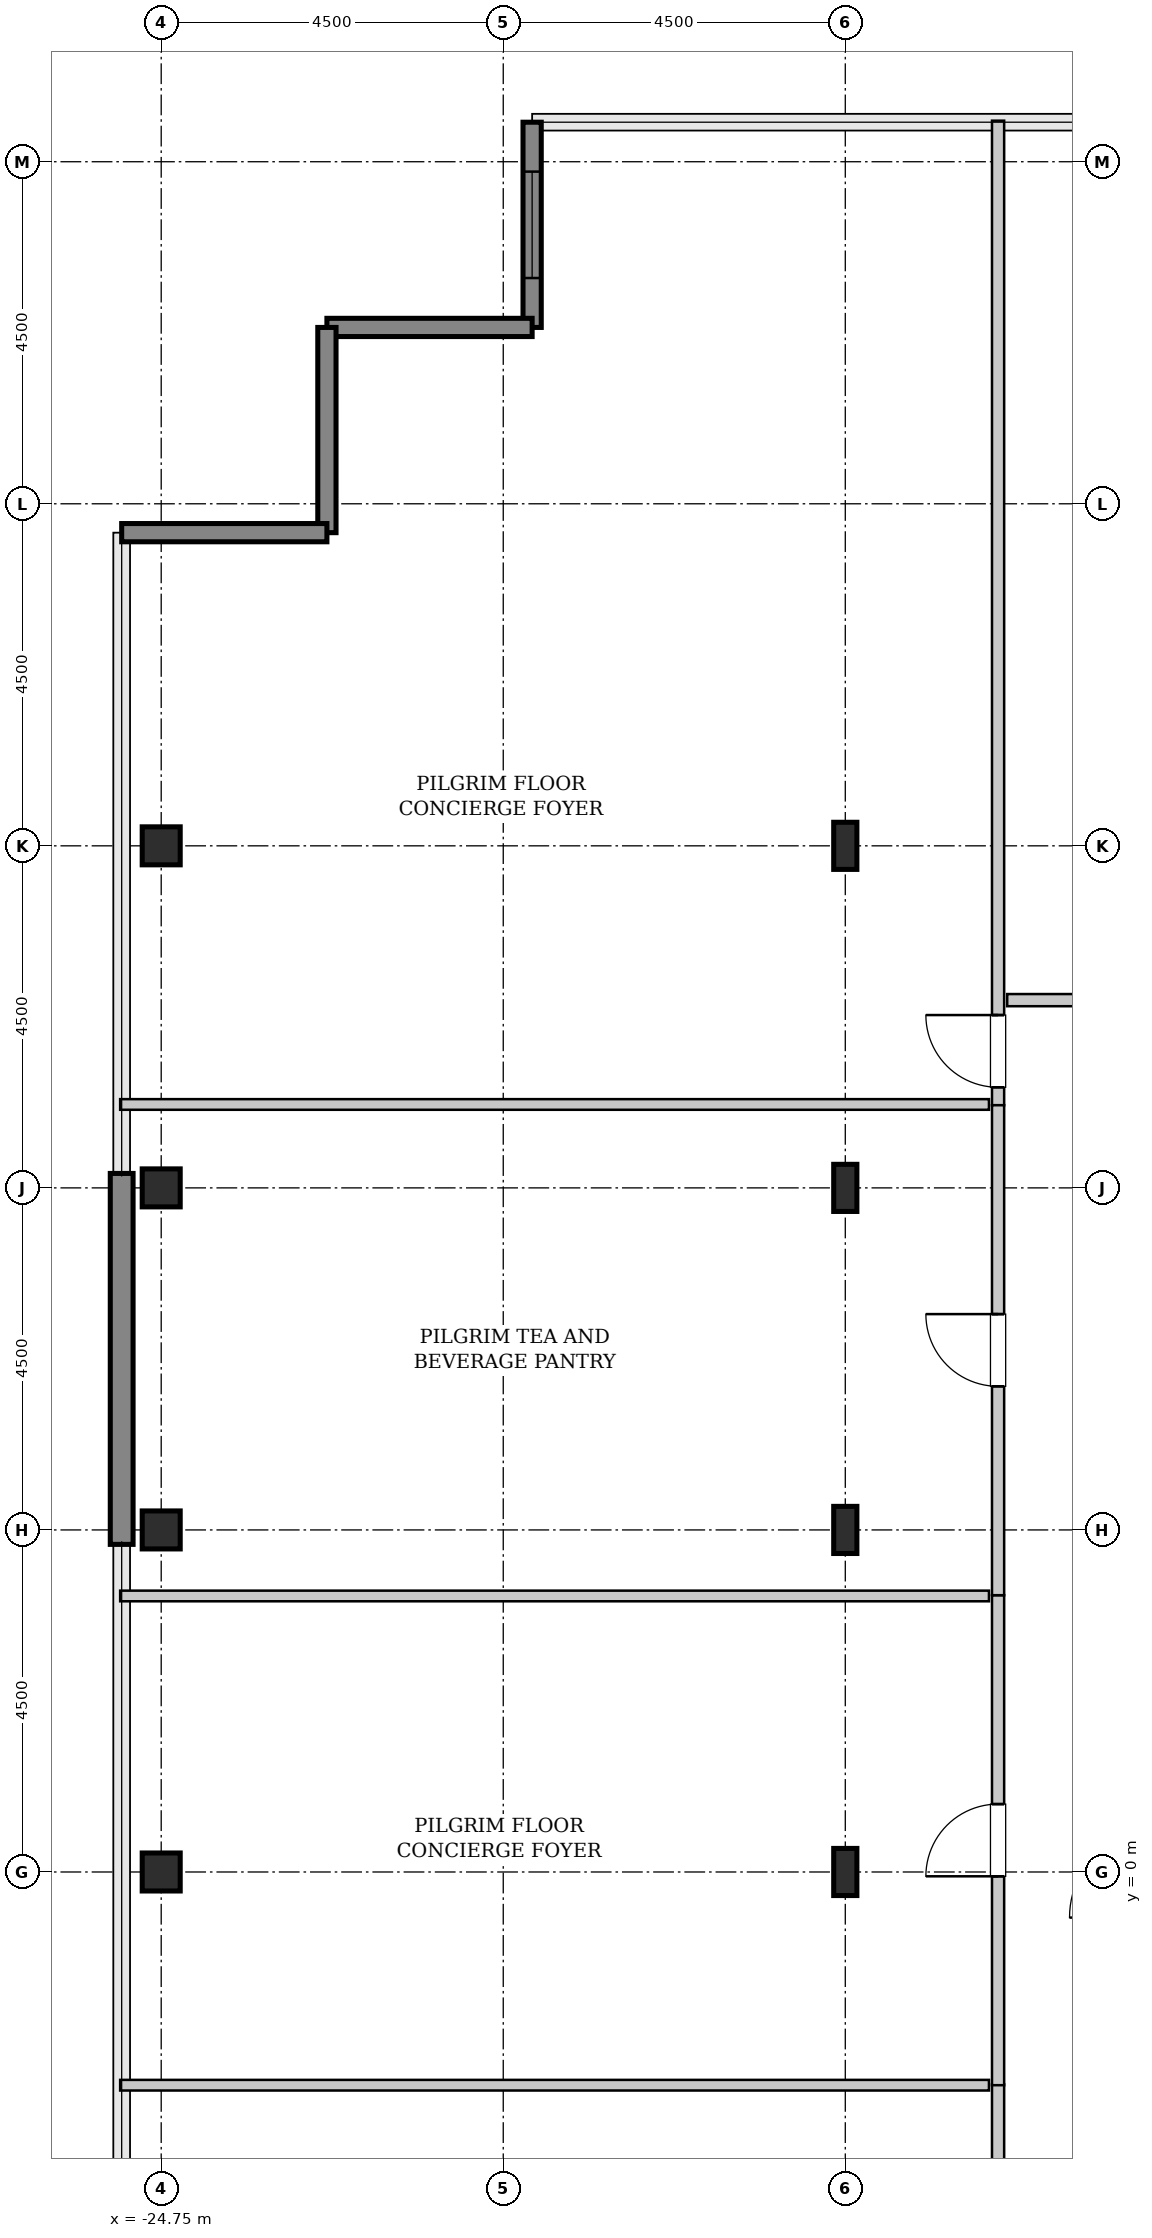
"""IFC4 building model, lengths in metres.
Left out: names, types, materials, properties, quantities, classifications, styles, units other than length and angle.
Written with IfcOpenShell. Run it as: python <this file> out.ifc"""

import sys

from ifc_helpers import new_model, si_unit, direction, frame, frame_2d, origin, origin_2d, place, context, subcontext, project, spatial, rectangle, hollow_rectangle, i_section, extrude, source, transform, mapped, element, fill, save


model = new_model("IFC4")
c1 = context("Model", 3, precision=1e-05, world=origin(), true_north=direction((0.0, 1.0)))
c2 = subcontext(c1, "Body", "Model", "MODEL_VIEW")
j1 = project(units=[si_unit("LENGTHUNIT", "METRE"), si_unit("PLANEANGLEUNIT", "RADIAN")], contexts=[c1])
p1 = place(None, origin())
s1 = spatial("IfcSite", under=j1, at=p1, CompositionType="ELEMENT")
p2 = place(p1, origin())
s2 = spatial("IfcBuilding", under=s1, at=p2, CompositionType="ELEMENT")
p3 = place(p2, frame((0.0, 0.0, 333.8)))
s3 = spatial("IfcBuildingStorey", under=s2, at=p3, CompositionType="ELEMENT", Elevation=333.8)
m1 = source(origin(), c2, "Body", "SweptSolid", [
    extrude(hollow_rectangle(XDim=0.5, YDim=0.5, WallThickness=0.025, InnerFilletRadius=0.025, OuterFilletRadius=0.05, at=origin_2d()), origin(), (0.0, 0.0, 1.0), 3.8),
])
for number, where, z_axis, x_axis in (
    (1, (-24.75, 0.0, 0.0), (0.0, 0.0, 1.0), (1.0, 0.0, 0.0)),
    (2, (-24.75, 4.5, 0.0), (0.0, 0.0, 1.0), (1.0, 0.0, 0.0)),
    (3, (-24.75, 9.0, 0.0), (0.0, 0.0, 1.0), (1.0, 0.0, 0.0)),
    (4, (-24.75, 13.5, 0.0), (0.0, 0.0, 1.0), (1.0, 0.0, 0.0)),
):
    element("IfcColumn", number, at=place(p3, frame(where, z_axis=z_axis, x_axis=x_axis)), inside=s3, PredefinedType="COLUMN", context=c2, shape_type="MappedRepresentation", body=[
        mapped(m1, transform((0.0, 0.0, 0.0), x_axis=(1.0, 0.0, 0.0), y_axis=(0.0, 1.0, 0.0), z_axis=(0.0, 0.0, 1.0), scale=1.0)),
    ])
m2 = source(origin(), c2, "Body", "SweptSolid", [
    extrude(i_section(OverallWidth=0.305, OverallDepth=0.62, WebThickness=0.021, FlangeThickness=0.04, FilletRadius=0.027, at=origin_2d()), origin(), (0.0, 0.0, 1.0), 3.8),
])
for number, where, z_axis, x_axis in (
    (5, (-15.75, 0.0, 0.0), (0.0, 0.0, 1.0), (1.0, 0.0, 0.0)),
    (6, (-15.75, 4.5, 0.0), (0.0, 0.0, 1.0), (1.0, 0.0, 0.0)),
    (7, (-15.75, 9.0, 0.0), (0.0, 0.0, 1.0), (1.0, 0.0, 0.0)),
    (8, (-15.75, 13.5, 0.0), (0.0, 0.0, 1.0), (1.0, 0.0, 0.0)),
):
    element("IfcColumn", number, at=place(p3, frame(where, z_axis=z_axis, x_axis=x_axis)), inside=s3, PredefinedType="COLUMN", context=c2, shape_type="MappedRepresentation", body=[
        mapped(m2, transform((0.0, 0.0, 0.0), x_axis=(1.0, 0.0, 0.0), y_axis=(0.0, 1.0, 0.0), z_axis=(0.0, 0.0, 1.0), scale=1.0)),
    ])
m3 = source(origin(), c2, "Body", "SweptSolid", [
    extrude(rectangle(XDim=4.88, YDim=0.3, at=frame_2d((2.44, 0.0))), origin(), (0.0, 0.0, 1.0), 3.55),
])
p4 = place(p3, frame((-25.27, 4.31, 0.0), z_axis=(0.0, 0.0, 1.0), x_axis=(0.0, 1.0, 0.0)))
e9 = element("IfcWall", 9, at=p4, inside=s3, PredefinedType="SHEAR", context=c2, shape_type="MappedRepresentation", body=[
    mapped(m3, transform((0.0, 0.0, 0.0), x_axis=(1.0, 0.0, 0.0), y_axis=(0.0, 1.0, 0.0), z_axis=(0.0, 0.0, 1.0), scale=1.0)),
])
m4 = source(origin(), c2, "Body", "SweptSolid", [
    extrude(rectangle(XDim=2.7, YDim=0.24, at=frame_2d((1.35, 0.0))), origin(), (0.0, 0.0, 1.0), 3.55),
])
p5 = place(p3, frame((-19.87, 23.02, 0.0), z_axis=(0.0, 0.0, 1.0), x_axis=(0.0, -1.0, 0.0)))
e10 = element("IfcWall", 10, at=p5, inside=s3, PredefinedType="SHEAR", context=c2, shape_type="MappedRepresentation", body=[
    mapped(m4, transform((0.0, 0.0, 0.0), x_axis=(1.0, 0.0, 0.0), y_axis=(0.0, 1.0, 0.0), z_axis=(0.0, 0.0, 1.0), scale=1.0)),
])
p6 = place(p5, frame((0.65, 0.0, 0.85)))
e11 = element("IfcOpeningElement", 11, at=p6, cuts=e10, PredefinedType="OPENING", context=c2, shape_type="SweptSolid", body=[
    extrude(rectangle(XDim=1.4, YDim=1.8, at=frame_2d((0.7, 0.9))), frame((0.0, 0.13, 0.0), z_axis=(0.0, -1.0, 0.0), x_axis=(1.0, 0.0, 0.0)), (0.0, 0.0, 1.0), 0.26),
])
for number, where, z_axis, x_axis in (
    (12, (-19.87, 20.32, 0.0), (0.0, 0.0, 1.0), (-1.0, 0.0, 0.0)),
    (13, (-22.57, 20.32, 0.0), (0.0, 0.0, 1.0), (0.0, -1.0, 0.0)),
    (14, (-22.57, 17.62, 0.0), (0.0, 0.0, 1.0), (-1.0, 0.0, 0.0)),
):
    element("IfcWall", number, at=place(p3, frame(where, z_axis=z_axis, x_axis=x_axis)), inside=s3, PredefinedType="SHEAR", context=c2, shape_type="MappedRepresentation", body=[
        mapped(m4, transform((0.0, 0.0, 0.0), x_axis=(1.0, 0.0, 0.0), y_axis=(0.0, 1.0, 0.0), z_axis=(0.0, 0.0, 1.0), scale=1.0)),
    ])
m5 = source(origin(), c2, "Body", "SweptSolid", [
    extrude(rectangle(XDim=20.245, YDim=0.16, at=frame_2d((10.123, 0.0))), origin(), (0.0, 0.0, 1.0), 3.535),
])
p7 = place(p3, frame((-13.74, -23.04, 0.0), z_axis=(0.0, 0.0, 1.0), x_axis=(0.0, 1.0, 0.0)))
e15 = element("IfcWall", 15, at=p7, inside=s3, PredefinedType="PARTITIONING", context=c2, shape_type="MappedRepresentation", body=[
    mapped(m5, transform((0.0, 0.0, 0.0), x_axis=(1.0, 0.0, 0.0), y_axis=(0.0, 1.0, 0.0), z_axis=(0.0, 0.0, 1.0), scale=1.0)),
])
p8 = place(p7, frame((15.413, 0.0, 0.0)))
e16 = element("IfcOpeningElement", 16, at=p8, cuts=e15, PredefinedType="OPENING", context=c2, shape_type="SweptSolid", body=[
    extrude(rectangle(XDim=0.95, YDim=2.1, at=frame_2d((0.475, 1.05))), frame((0.0, 0.09, 0.0), z_axis=(0.0, -1.0, 0.0), x_axis=(1.0, 0.0, 0.0)), (0.0, 0.0, 1.0), 0.18),
])
m6 = source(origin(), c2, "Body", "SweptSolid", [
    extrude(rectangle(XDim=11.43, YDim=0.14, at=frame_2d((5.715, 0.0))), origin(), (0.0, 0.0, 1.0), 3.535),
])
p9 = place(p3, frame((-25.29, -2.805, 0.0), z_axis=(0.0, 0.0, 1.0), x_axis=(1.0, 0.0, 0.0)))
e17 = element("IfcWall", 17, at=p9, inside=s3, PredefinedType="PARTITIONING", context=c2, shape_type="MappedRepresentation", body=[
    mapped(m6, transform((0.0, 0.0, 0.0), x_axis=(1.0, 0.0, 0.0), y_axis=(0.0, 1.0, 0.0), z_axis=(0.0, 0.0, 1.0), scale=1.0)),
])
m7 = source(origin(), c2, "Body", "SweptSolid", [
    extrude(rectangle(XDim=12.953, YDim=0.16, at=frame_2d((6.476, 0.0))), origin(), (0.0, 0.0, 1.0), 3.535),
])
p10 = place(p3, frame((-13.74, 10.087, 0.0), z_axis=(0.0, 0.0, 1.0), x_axis=(0.0, 1.0, 0.0)))
e18 = element("IfcWall", 18, at=p10, inside=s3, PredefinedType="PARTITIONING", context=c2, shape_type="MappedRepresentation", body=[
    mapped(m7, transform((0.0, 0.0, 0.0), x_axis=(1.0, 0.0, 0.0), y_axis=(0.0, 1.0, 0.0), z_axis=(0.0, 0.0, 1.0), scale=1.0)),
])
p11 = place(p10, frame((0.236, 0.0, 0.0)))
e19 = element("IfcOpeningElement", 19, at=p11, cuts=e18, PredefinedType="OPENING", context=c2, shape_type="SweptSolid", body=[
    extrude(rectangle(XDim=0.95, YDim=2.1, at=frame_2d((0.475, 1.05))), frame((0.0, 0.09, 0.0), z_axis=(0.0, -1.0, 0.0), x_axis=(1.0, 0.0, 0.0)), (0.0, 0.0, 1.0), 0.18),
])
p12 = place(p3, frame((-25.29, 10.097, 0.0), z_axis=(0.0, 0.0, 1.0), x_axis=(1.0, 0.0, 0.0)))
e20 = element("IfcWall", 20, at=p12, inside=s3, PredefinedType="PARTITIONING", context=c2, shape_type="MappedRepresentation", body=[
    mapped(m6, transform((0.0, 0.0, 0.0), x_axis=(1.0, 0.0, 0.0), y_axis=(0.0, 1.0, 0.0), z_axis=(0.0, 0.0, 1.0), scale=1.0)),
])
m8 = source(origin(), c2, "Body", "SweptSolid", [
    extrude(rectangle(XDim=6.446, YDim=0.16, at=frame_2d((3.223, 0.0))), origin(), (0.0, 0.0, 1.0), 3.535),
])
p13 = place(p3, frame((-13.74, -2.805, 0.0), z_axis=(0.0, 0.0, 1.0), x_axis=(0.0, 1.0, 0.0)))
e21 = element("IfcWall", 21, at=p13, inside=s3, PredefinedType="PARTITIONING", context=c2, shape_type="MappedRepresentation", body=[
    mapped(m8, transform((0.0, 0.0, 0.0), x_axis=(1.0, 0.0, 0.0), y_axis=(0.0, 1.0, 0.0), z_axis=(0.0, 0.0, 1.0), scale=1.0)),
])
p14 = place(p13, frame((2.748, 0.0, 0.0)))
e22 = element("IfcOpeningElement", 22, at=p14, cuts=e21, PredefinedType="OPENING", context=c2, shape_type="SweptSolid", body=[
    extrude(rectangle(XDim=0.95, YDim=2.1, at=frame_2d((0.475, 1.05))), frame((0.0, 0.09, 0.0), z_axis=(0.0, -1.0, 0.0), x_axis=(1.0, 0.0, 0.0)), (0.0, 0.0, 1.0), 0.18),
])
p15 = place(p3, frame((-25.29, 3.631, 0.0), z_axis=(0.0, 0.0, 1.0), x_axis=(1.0, 0.0, 0.0)))
e23 = element("IfcWall", 23, at=p15, inside=s3, PredefinedType="PARTITIONING", context=c2, shape_type="MappedRepresentation", body=[
    mapped(m6, transform((0.0, 0.0, 0.0), x_axis=(1.0, 0.0, 0.0), y_axis=(0.0, 1.0, 0.0), z_axis=(0.0, 0.0, 1.0), scale=1.0)),
])
m9 = source(origin(), c2, "Body", "SweptSolid", [
    extrude(rectangle(XDim=6.446, YDim=0.16, at=frame_2d((3.223, 0.0))), origin(), (0.0, 0.0, 1.0), 3.535),
])
p16 = place(p3, frame((-13.74, 3.641, 0.0), z_axis=(0.0, 0.0, 1.0), x_axis=(0.0, 1.0, 0.0)))
e24 = element("IfcWall", 24, at=p16, inside=s3, PredefinedType="PARTITIONING", context=c2, shape_type="MappedRepresentation", body=[
    mapped(m9, transform((0.0, 0.0, 0.0), x_axis=(1.0, 0.0, 0.0), y_axis=(0.0, 1.0, 0.0), z_axis=(0.0, 0.0, 1.0), scale=1.0)),
])
p17 = place(p16, frame((2.748, 0.0, 0.0)))
e25 = element("IfcOpeningElement", 25, at=p17, cuts=e24, PredefinedType="OPENING", context=c2, shape_type="SweptSolid", body=[
    extrude(rectangle(XDim=0.95, YDim=2.1, at=frame_2d((0.475, 1.05))), frame((0.0, 0.09, 0.0), z_axis=(0.0, -1.0, 0.0), x_axis=(1.0, 0.0, 0.0)), (0.0, 0.0, 1.0), 0.18),
])
m10 = source(origin(), c2, "Body", "SweptSolid", [
    extrude(rectangle(XDim=4.125, YDim=0.16, at=frame_2d((2.062, 0.0))), origin(), (0.0, 0.0, 1.0), 3.535),
])
p18 = place(p3, frame((-13.62, 11.47, 0.0), z_axis=(0.0, 0.0, 1.0), x_axis=(1.0, 0.0, 0.0)))
e26 = element("IfcWall", 26, at=p18, inside=s3, PredefinedType="PARTITIONING", context=c2, shape_type="MappedRepresentation", body=[
    mapped(m10, transform((0.0, 0.0, 0.0), x_axis=(1.0, 0.0, 0.0), y_axis=(0.0, 1.0, 0.0), z_axis=(0.0, 0.0, 1.0), scale=1.0)),
])
p19 = place(p18, frame((1.587, 0.0, 0.0)))
e27 = element("IfcOpeningElement", 27, at=p19, cuts=e26, PredefinedType="OPENING", context=c2, shape_type="SweptSolid", body=[
    extrude(rectangle(XDim=0.95, YDim=2.1, at=frame_2d((0.475, 1.05))), frame((0.0, 0.09, 0.0), z_axis=(0.0, -1.0, 0.0), x_axis=(1.0, 0.0, 0.0)), (0.0, 0.0, 1.0), 0.18),
])
m11 = source(origin(), c2, "Body", "SweptSolid", [
    extrude(rectangle(XDim=1.4, YDim=1.8, at=frame_2d((0.7, 0.9))), frame((0.0, 0.03, 0.0), z_axis=(0.0, -1.0, 0.0), x_axis=(1.0, 0.0, 0.0)), (0.0, 0.0, 1.0), 0.06),
])
p20 = place(p6, origin())
e28 = element("IfcWindow", 28, at=p20, inside=s3, PartitioningType="SINGLE_PANEL", PredefinedType="WINDOW", context=c2, shape_type="MappedRepresentation", body=[
    mapped(m11, transform((0.0, 0.0, 0.0), x_axis=(1.0, 0.0, 0.0), y_axis=(0.0, 1.0, 0.0), z_axis=(0.0, 0.0, 1.0), scale=1.0)),
])
fill(e11, e28)
m12 = source(origin(), c2, "Body", "SweptSolid", [
    extrude(rectangle(XDim=0.95, YDim=2.1, at=frame_2d((0.475, 1.05))), frame((0.0, 0.025, 0.0), z_axis=(0.0, -1.0, 0.0), x_axis=(1.0, 0.0, 0.0)), (0.0, 0.0, 1.0), 0.05),
])
p21 = place(p11, origin())
e29 = element("IfcDoor", 29, at=p21, inside=s3, OperationType="SINGLE_SWING_RIGHT", PredefinedType="DOOR", context=c2, shape_type="MappedRepresentation", body=[
    mapped(m12, transform((0.0, 0.0, 0.0), x_axis=(1.0, 0.0, 0.0), y_axis=(0.0, 1.0, 0.0), z_axis=(0.0, 0.0, 1.0), scale=1.0)),
])
fill(e19, e29)
p22 = place(p14, origin())
e30 = element("IfcDoor", 30, at=p22, inside=s3, OperationType="SINGLE_SWING_LEFT", PredefinedType="DOOR", context=c2, shape_type="MappedRepresentation", body=[
    mapped(m12, transform((0.0, 0.0, 0.0), x_axis=(1.0, 0.0, 0.0), y_axis=(0.0, 1.0, 0.0), z_axis=(0.0, 0.0, 1.0), scale=1.0)),
])
fill(e22, e30)
p23 = place(p17, origin())
e31 = element("IfcDoor", 31, at=p23, inside=s3, OperationType="SINGLE_SWING_RIGHT", PredefinedType="DOOR", context=c2, shape_type="MappedRepresentation", body=[
    mapped(m12, transform((0.0, 0.0, 0.0), x_axis=(1.0, 0.0, 0.0), y_axis=(0.0, 1.0, 0.0), z_axis=(0.0, 0.0, 1.0), scale=1.0)),
])
fill(e25, e31)
save(model, sys.argv[1])
